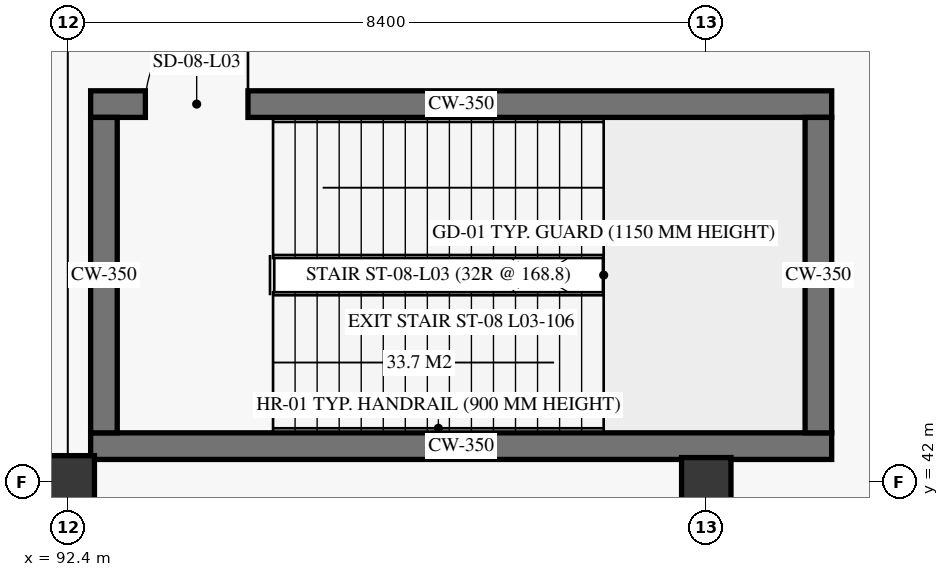
"""IFC4 building model, lengths in metres.
Left out: names, types, materials, properties, quantities, classifications, styles, units other than length and angle.
Written with IfcOpenShell. Run it as: python <this file> out.ifc"""

import sys

from ifc_helpers import new_model, si_unit, direction, frame, frame_2d, origin, origin_2d, place, context, subcontext, project, spatial, rectangle, extrude, element, fill, save


model = new_model("IFC4")
c1 = context("Model", 3, precision=1e-05, world=origin(), true_north=direction((0.0, 1.0)))
c2 = subcontext(c1, "Body", "Model", "MODEL_VIEW")
j1 = project(units=[si_unit("LENGTHUNIT", "METRE"), si_unit("PLANEANGLEUNIT", "RADIAN")], contexts=[c1])
p1 = place(None, origin())
s1 = spatial("IfcSite", under=j1, at=p1, CompositionType="ELEMENT")
p2 = place(p1, origin())
s2 = spatial("IfcBuilding", under=s1, at=p2, CompositionType="ELEMENT")
p3 = place(p2, frame((0.0, 0.0, 11.4)))
s3 = spatial("IfcBuildingStorey", under=s2, at=p3, CompositionType="ELEMENT", Elevation=11.4)
p4 = place(p3, frame((92.4, 42.0, 0.0), z_axis=(0.0, 0.0, 1.0), x_axis=(1.0, 0.0, 0.0)))
e1 = element("IfcColumn", 1, at=p4, inside=s3, PredefinedType="COLUMN", context=c2, shape_type="SweptSolid", body=[
    extrude(rectangle(XDim=0.7, YDim=0.7, at=origin_2d()), origin(), (0.0, 0.0, 1.0), 5.1),
])
p5 = place(p3, frame((100.8, 42.0, 0.0), z_axis=(0.0, 0.0, 1.0), x_axis=(1.0, 0.0, 0.0)))
e2 = element("IfcColumn", 2, at=p5, inside=s3, PredefinedType="COLUMN", context=c2, shape_type="SweptSolid", body=[
    extrude(rectangle(XDim=0.65, YDim=0.65, at=origin_2d()), origin(), (0.0, 0.0, 1.0), 5.1),
])
p6 = place(p3, frame((92.7, 42.475, 0.0), z_axis=(0.0, 0.0, 1.0), x_axis=(1.0, 0.0, 0.0)))
e3 = element("IfcWall", 3, at=p6, inside=s3, PredefinedType="SHEAR", context=c2, shape_type="SweptSolid", body=[
    extrude(rectangle(XDim=9.75, YDim=0.35, at=frame_2d((4.875, 0.0))), origin(), (0.0, 0.0, 1.0), 5.1),
])
p7 = place(p3, frame((92.7, 46.975, 0.0), z_axis=(0.0, 0.0, 1.0), x_axis=(1.0, 0.0, 0.0)))
e4 = element("IfcWall", 4, at=p7, inside=s3, PredefinedType="SHEAR", context=c2, shape_type="SweptSolid", body=[
    extrude(rectangle(XDim=9.75, YDim=0.35, at=frame_2d((4.875, 0.0))), origin(), (0.0, 0.0, 1.0), 5.1),
])
p8 = place(p7, frame((0.72, 0.0, 0.0)))
e5 = element("IfcOpeningElement", 5, at=p8, cuts=e4, PredefinedType="OPENING", context=c2, shape_type="SweptSolid", body=[
    extrude(rectangle(XDim=1.35, YDim=2.25, at=frame_2d((0.675, 1.125))), frame((0.0, 0.185, 0.0), z_axis=(0.0, -1.0, 0.0), x_axis=(1.0, 0.0, 0.0)), (0.0, 0.0, 1.0), 0.37),
])
for number, where, z_axis, x_axis in (
    (6, (92.875, 42.65, 0.0), (0.0, 0.0, 1.0), (0.0, 1.0, 0.0)),
    (7, (102.275, 42.65, 0.0), (0.0, 0.0, 1.0), (0.0, 1.0, 0.0)),
):
    element("IfcWall", number, at=place(p3, frame(where, z_axis=z_axis, x_axis=x_axis)), inside=s3, PredefinedType="SHEAR", context=c2, shape_type="SweptSolid", body=[
        extrude(rectangle(XDim=4.15, YDim=0.35, at=frame_2d((2.075, 0.0))), origin(), (0.0, 0.0, 1.0), 5.1),
    ])
p9 = place(p8, origin())
e8 = element("IfcDoor", 8, at=p9, inside=s3, OperationType="SINGLE_SWING_RIGHT", PredefinedType="DOOR", context=c2, shape_type="SweptSolid", body=[
    extrude(rectangle(XDim=1.35, YDim=2.25, at=frame_2d((0.675, 1.125))), frame((0.0, 0.025, 0.0), z_axis=(0.0, -1.0, 0.0), x_axis=(1.0, 0.0, 0.0)), (0.0, 0.0, 1.0), 0.05),
])
fill(e5, e8)
save(model, sys.argv[1])
